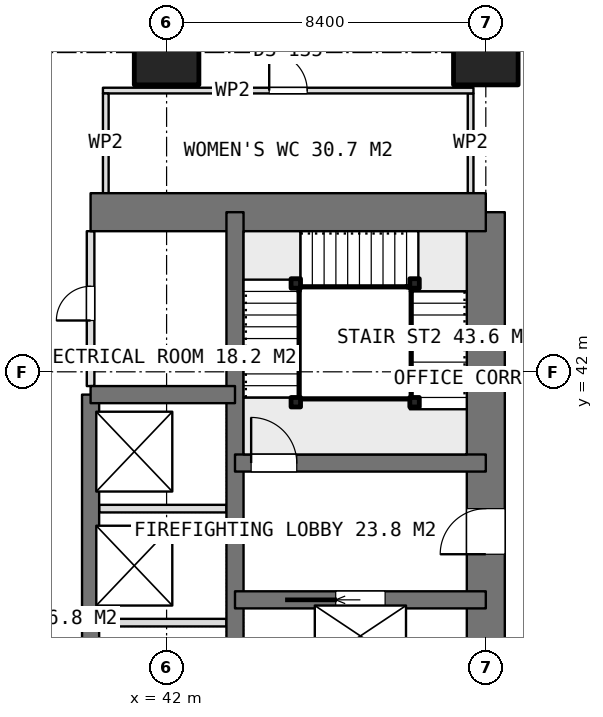
"""IFC4 building model, lengths in metres.
Left out: names, types, materials, properties, quantities, classifications, styles, units other than length and angle.
Written with IfcOpenShell. Run it as: python <this file> out.ifc"""

import sys

from ifc_helpers import new_model, si_unit, direction, frame, frame_2d, origin, origin_2d, place, context, subcontext, project, spatial, rectangle, extrude, element, fill, save


model = new_model("IFC4")
c1 = context("Model", 3, precision=1e-05, world=origin(), true_north=direction((0.0, 1.0)))
c2 = subcontext(c1, "Body", "Model", "MODEL_VIEW")
j1 = project(units=[si_unit("LENGTHUNIT", "METRE"), si_unit("PLANEANGLEUNIT", "RADIAN")], contexts=[c1])
p1 = place(None, origin())
s1 = spatial("IfcSite", under=j1, at=p1, CompositionType="ELEMENT")
p2 = place(p1, origin())
s2 = spatial("IfcBuilding", under=s1, at=p2, CompositionType="ELEMENT")
p3 = place(p2, frame((0.0, 0.0, 125.3)))
s3 = spatial("IfcBuildingStorey", under=s2, at=p3, CompositionType="ELEMENT", Elevation=125.3)
p4 = place(p3, frame((40.0, 46.2, 0.0), z_axis=(0.0, 0.0, 1.0), x_axis=(1.0, 0.0, 0.0)))
e1 = element("IfcWall", 1, at=p4, inside=s3, PredefinedType="SHEAR", context=c2, shape_type="SweptSolid", body=[
    extrude(rectangle(XDim=10.4, YDim=1.0, at=frame_2d((5.2, 0.0))), origin(), (0.0, 0.0, 1.0), 3.75),
])
p5 = place(p3, frame((50.4, 21.0, 0.0), z_axis=(0.0, 0.0, 1.0), x_axis=(0.0, 1.0, 0.0)))
e2 = element("IfcWall", 2, at=p5, inside=s3, PredefinedType="SHEAR", context=c2, shape_type="SweptSolid", body=[
    extrude(rectangle(XDim=25.2, YDim=1.0, at=frame_2d((12.6, 0.0))), origin(), (0.0, 0.0, 1.0), 3.75),
])
p6 = place(p5, frame((16.2, 0.0, 0.0)))
e3 = element("IfcOpeningElement", 3, at=p6, cuts=e2, PredefinedType="OPENING", context=c2, shape_type="SweptSolid", body=[
    extrude(rectangle(XDim=1.2, YDim=2.1, at=frame_2d((0.6, 1.05))), frame((0.0, 0.51, 0.0), z_axis=(0.0, -1.0, 0.0), x_axis=(1.0, 0.0, 0.0)), (0.0, 0.0, 1.0), 1.02),
])
p7 = place(p5, frame((10.05, 0.0, 0.0)))
e4 = element("IfcOpeningElement", 4, at=p7, cuts=e2, PredefinedType="OPENING", context=c2, shape_type="SweptSolid", body=[
    extrude(rectangle(XDim=0.9, YDim=2.1, at=frame_2d((0.45, 1.05))), frame((0.0, 0.51, 0.0), z_axis=(0.0, -1.0, 0.0), x_axis=(1.0, 0.0, 0.0)), (0.0, 0.0, 1.0), 1.02),
])
p8 = place(p5, frame((7.45, 0.0, 0.0)))
e5 = element("IfcOpeningElement", 5, at=p8, cuts=e2, PredefinedType="OPENING", context=c2, shape_type="SweptSolid", body=[
    extrude(rectangle(XDim=0.9, YDim=2.1, at=frame_2d((0.45, 1.05))), frame((0.0, 0.51, 0.0), z_axis=(0.0, -1.0, 0.0), x_axis=(1.0, 0.0, 0.0)), (0.0, 0.0, 1.0), 1.02),
])
p9 = place(p5, frame((0.7, 0.0, 0.0)))
e6 = element("IfcOpeningElement", 6, at=p9, cuts=e2, PredefinedType="OPENING", context=c2, shape_type="SweptSolid", body=[
    extrude(rectangle(XDim=1.2, YDim=2.1, at=frame_2d((0.6, 1.05))), frame((0.0, 0.51, 0.0), z_axis=(0.0, -1.0, 0.0), x_axis=(1.0, 0.0, 0.0)), (0.0, 0.0, 1.0), 1.02),
])
p10 = place(p3, frame((43.8, 21.0, 0.0), z_axis=(0.0, 0.0, 1.0), x_axis=(0.0, 1.0, 0.0)))
e7 = element("IfcWall", 7, at=p10, inside=s3, PredefinedType="SHEAR", context=c2, shape_type="SweptSolid", body=[
    extrude(rectangle(XDim=25.2, YDim=0.45, at=frame_2d((12.6, 0.0))), origin(), (0.0, 0.0, 1.0), 3.75),
])
p11 = place(p3, frame((40.0, 23.4, 0.0), z_axis=(0.0, 0.0, 1.0), x_axis=(0.0, 1.0, 0.0)))
e8 = element("IfcWall", 8, at=p11, inside=s3, PredefinedType="SHEAR", context=c2, shape_type="SweptSolid", body=[
    extrude(rectangle(XDim=18.0, YDim=0.45, at=frame_2d((9.0, 0.0))), origin(), (0.0, 0.0, 1.0), 3.75),
])
p12 = place(p11, frame((2.55, 0.0, 0.0)))
e9 = element("IfcOpeningElement", 9, at=p12, cuts=e8, PredefinedType="OPENING", context=c2, shape_type="SweptSolid", body=[
    extrude(rectangle(XDim=0.9, YDim=2.1, at=frame_2d((0.45, 1.05))), frame((0.0, 0.235, 0.0), z_axis=(0.0, -1.0, 0.0), x_axis=(1.0, 0.0, 0.0)), (0.0, 0.0, 1.0), 0.47),
])
p13 = place(p3, frame((40.0, 41.4, 0.0), z_axis=(0.0, 0.0, 1.0), x_axis=(1.0, 0.0, 0.0)))
e10 = element("IfcWall", 10, at=p13, inside=s3, PredefinedType="SHEAR", context=c2, shape_type="SweptSolid", body=[
    extrude(rectangle(XDim=3.8, YDim=0.45, at=frame_2d((1.9, 0.0))), origin(), (0.0, 0.0, 1.0), 3.75),
])
p14 = place(p3, frame((43.8, 36.0, 0.0), z_axis=(0.0, 0.0, 1.0), x_axis=(1.0, 0.0, 0.0)))
e11 = element("IfcWall", 11, at=p14, inside=s3, PredefinedType="SHEAR", context=c2, shape_type="SweptSolid", body=[
    extrude(rectangle(XDim=6.6, YDim=0.45, at=frame_2d((3.3, 0.0))), origin(), (0.0, 0.0, 1.0), 3.75),
])
p15 = place(p14, frame((2.65, 0.0, 0.0)))
e12 = element("IfcOpeningElement", 12, at=p15, cuts=e11, PredefinedType="OPENING", context=c2, shape_type="SweptSolid", body=[
    extrude(rectangle(XDim=1.3, YDim=2.1, at=frame_2d((0.65, 1.05))), frame((0.0, 0.235, 0.0), z_axis=(0.0, -1.0, 0.0), x_axis=(1.0, 0.0, 0.0)), (0.0, 0.0, 1.0), 0.47),
])
p16 = place(p3, frame((43.8, 39.6, 0.0), z_axis=(0.0, 0.0, 1.0), x_axis=(1.0, 0.0, 0.0)))
e13 = element("IfcWall", 13, at=p16, inside=s3, PredefinedType="SHEAR", context=c2, shape_type="SweptSolid", body=[
    extrude(rectangle(XDim=6.6, YDim=0.45, at=frame_2d((3.3, 0.0))), origin(), (0.0, 0.0, 1.0), 3.75),
])
p17 = place(p16, frame((0.425, 0.0, 0.0)))
e14 = element("IfcOpeningElement", 14, at=p17, cuts=e13, PredefinedType="OPENING", context=c2, shape_type="SweptSolid", body=[
    extrude(rectangle(XDim=1.2, YDim=2.1, at=frame_2d((0.6, 1.05))), frame((0.0, 0.235, 0.0), z_axis=(0.0, -1.0, 0.0), x_axis=(1.0, 0.0, 0.0)), (0.0, 0.0, 1.0), 0.47),
])
for number, where, z_axis, x_axis in (
    (15, (42.0, 50.4, 0.0), (0.0, 0.0, 1.0), (1.0, 0.0, 0.0)),
    (16, (50.4, 50.4, 0.0), (0.0, 0.0, 1.0), (1.0, 0.0, 0.0)),
):
    element("IfcColumn", number, at=place(p3, frame(where, z_axis=z_axis, x_axis=x_axis)), inside=s3, PredefinedType="COLUMN", context=c2, shape_type="SweptSolid", body=[
        extrude(rectangle(XDim=1.7, YDim=1.7, at=origin_2d()), origin(), (0.0, 0.0, 1.0), 3.75),
    ])
for number, where, z_axis, x_axis in (
    (17, (40.225, 35.4, 0.0), (0.0, 0.0, 1.0), (1.0, 0.0, 0.0)),
    (18, (40.225, 38.4, 0.0), (0.0, 0.0, 1.0), (1.0, 0.0, 0.0)),
):
    element("IfcWall", number, at=place(p3, frame(where, z_axis=z_axis, x_axis=x_axis)), inside=s3, PredefinedType="PARTITIONING", context=c2, shape_type="SweptSolid", body=[
        extrude(rectangle(XDim=3.35, YDim=0.2, at=frame_2d((1.675, 0.0))), origin(), (0.0, 0.0, 1.0), 3.5),
    ])
p18 = place(p3, frame((40.0, 41.625, 0.0), z_axis=(0.0, 0.0, 1.0), x_axis=(0.0, 1.0, 0.0)))
e19 = element("IfcWall", 19, at=p18, inside=s3, PredefinedType="PARTITIONING", context=c2, shape_type="SweptSolid", body=[
    extrude(rectangle(XDim=4.075, YDim=0.2, at=frame_2d((2.038, 0.0))), origin(), (0.0, 0.0, 1.0), 3.5),
])
p19 = place(p18, frame((1.725, 0.0, 0.0)))
e20 = element("IfcOpeningElement", 20, at=p19, cuts=e19, PredefinedType="OPENING", context=c2, shape_type="SweptSolid", body=[
    extrude(rectangle(XDim=0.9, YDim=2.1, at=frame_2d((0.45, 1.05))), frame((0.0, 0.11, 0.0), z_axis=(0.0, -1.0, 0.0), x_axis=(1.0, 0.0, 0.0)), (0.0, 0.0, 1.0), 0.22),
])
p20 = place(p3, frame((40.325, 49.4, 0.0), z_axis=(0.0, 0.0, 1.0), x_axis=(1.0, 0.0, 0.0)))
e21 = element("IfcWall", 21, at=p20, inside=s3, PredefinedType="PARTITIONING", context=c2, shape_type="SweptSolid", body=[
    extrude(rectangle(XDim=9.75, YDim=0.15, at=frame_2d((4.875, 0.0))), origin(), (0.0, 0.0, 1.0), 3.5),
])
p21 = place(p20, frame((4.375, 0.0, 0.0)))
e22 = element("IfcOpeningElement", 22, at=p21, cuts=e21, PredefinedType="OPENING", context=c2, shape_type="SweptSolid", body=[
    extrude(rectangle(XDim=1.0, YDim=2.1, at=frame_2d((0.5, 1.05))), frame((0.0, 0.085, 0.0), z_axis=(0.0, -1.0, 0.0), x_axis=(1.0, 0.0, 0.0)), (0.0, 0.0, 1.0), 0.17),
])
for number, where, z_axis, x_axis in (
    (23, (40.4, 46.7, 0.0), (0.0, 0.0, 1.0), (0.0, 1.0, 0.0)),
    (24, (50.0, 46.7, 0.0), (0.0, 0.0, 1.0), (0.0, 1.0, 0.0)),
):
    element("IfcWall", number, at=place(p3, frame(where, z_axis=z_axis, x_axis=x_axis)), inside=s3, PredefinedType="PARTITIONING", context=c2, shape_type="SweptSolid", body=[
        extrude(rectangle(XDim=2.625, YDim=0.15, at=frame_2d((1.312, 0.0))), origin(), (0.0, 0.0, 1.0), 3.5),
    ])
for number, where, z_axis, x_axis in (
    (25, (45.4, 41.2, 0.0), (0.0, 0.0, 1.0), (1.0, 0.0, 0.0)),
    (26, (45.4, 44.325, 0.0), (0.0, 0.0, 1.0), (1.0, 0.0, 0.0)),
    (27, (48.525, 44.325, 0.0), (0.0, 0.0, 1.0), (1.0, 0.0, 0.0)),
    (28, (48.525, 41.2, 0.0), (0.0, 0.0, 1.0), (1.0, 0.0, 0.0)),
):
    element("IfcColumn", number, at=place(p3, frame(where, z_axis=z_axis, x_axis=x_axis)), inside=s3, PredefinedType="COLUMN", context=c2, shape_type="SweptSolid", body=[
        extrude(rectangle(XDim=0.25, YDim=0.25, at=origin_2d()), origin(), (0.0, 0.0, 1.0), 3.75),
    ])
p22 = place(p6, origin())
e29 = element("IfcDoor", 29, at=p22, inside=s3, OperationType="SINGLE_SWING_LEFT", PredefinedType="DOOR", context=c2, shape_type="SweptSolid", body=[
    extrude(rectangle(XDim=1.2, YDim=2.1, at=frame_2d((0.6, 1.05))), frame((0.0, 0.025, 0.0), z_axis=(0.0, -1.0, 0.0), x_axis=(1.0, 0.0, 0.0)), (0.0, 0.0, 1.0), 0.05),
])
fill(e3, e29)
p23 = place(p19, origin())
e30 = element("IfcDoor", 30, at=p23, inside=s3, OperationType="SINGLE_SWING_LEFT", PredefinedType="DOOR", context=c2, shape_type="SweptSolid", body=[
    extrude(rectangle(XDim=0.9, YDim=2.1, at=frame_2d((0.45, 1.05))), frame((0.0, 0.025, 0.0), z_axis=(0.0, -1.0, 0.0), x_axis=(1.0, 0.0, 0.0)), (0.0, 0.0, 1.0), 0.05),
])
fill(e20, e30)
p24 = place(p15, origin())
e31 = element("IfcDoor", 31, at=p24, inside=s3, OperationType="SLIDING_TO_LEFT", PredefinedType="USERDEFINED", context=c2, shape_type="SweptSolid", body=[
    extrude(rectangle(XDim=1.3, YDim=2.1, at=frame_2d((0.65, 1.05))), frame((0.0, 0.025, 0.0), z_axis=(0.0, -1.0, 0.0), x_axis=(1.0, 0.0, 0.0)), (0.0, 0.0, 1.0), 0.05),
])
fill(e12, e31)
p25 = place(p21, origin())
e32 = element("IfcDoor", 32, at=p25, inside=s3, OperationType="SINGLE_SWING_LEFT", PredefinedType="DOOR", context=c2, shape_type="SweptSolid", body=[
    extrude(rectangle(XDim=1.0, YDim=2.1, at=frame_2d((0.5, 1.05))), frame((0.0, 0.025, 0.0), z_axis=(0.0, -1.0, 0.0), x_axis=(1.0, 0.0, 0.0)), (0.0, 0.0, 1.0), 0.05),
])
fill(e22, e32)
p26 = place(p17, origin())
e33 = element("IfcDoor", 33, at=p26, inside=s3, OperationType="SINGLE_SWING_RIGHT", PredefinedType="DOOR", context=c2, shape_type="SweptSolid", body=[
    extrude(rectangle(XDim=1.2, YDim=2.1, at=frame_2d((0.6, 1.05))), frame((0.0, 0.025, 0.0), z_axis=(0.0, -1.0, 0.0), x_axis=(1.0, 0.0, 0.0)), (0.0, 0.0, 1.0), 0.05),
])
fill(e14, e33)
save(model, sys.argv[1])
